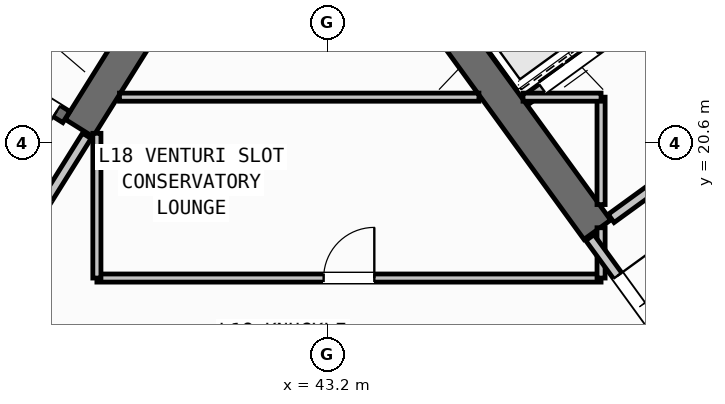
"""IFC4 building model, lengths in metres.
Left out: names, types, materials, properties, quantities, classifications, styles, units other than length and angle.
Written with IfcOpenShell. Run it as: python <this file> out.ifc"""

import sys

from ifc_helpers import new_model, si_unit, direction, frame, frame_2d, origin, place, context, subcontext, project, spatial, rectangle, extrude, source, transform, mapped, element, fill, save


model = new_model("IFC4")
c1 = context("Model", 3, precision=1e-05, world=origin(), true_north=direction((0.0, 1.0)))
c2 = subcontext(c1, "Body", "Model", "MODEL_VIEW")
j1 = project(units=[si_unit("LENGTHUNIT", "METRE"), si_unit("PLANEANGLEUNIT", "RADIAN")], contexts=[c1])
p1 = place(None, origin())
s1 = spatial("IfcSite", under=j1, at=p1, CompositionType="ELEMENT")
p2 = place(p1, origin())
s2 = spatial("IfcBuilding", under=s1, at=p2, CompositionType="ELEMENT")
p3 = place(p2, frame((0.0, 0.0, 71.7)))
s3 = spatial("IfcBuildingStorey", under=s2, at=p3, CompositionType="ELEMENT", Elevation=71.7)
p4 = place(p3, frame((40.168, 23.88, 0.0), z_axis=(0.0, 0.0, 1.0), x_axis=(-0.529893103397, -0.8480644427, 0.0)))
e1 = element("IfcWall", 1, at=p4, inside=s3, PredefinedType="SHEAR", context=c2, shape_type="SweptSolid", body=[
    extrude(rectangle(XDim=3.525, YDim=0.65, at=frame_2d((1.763, 0.0))), origin(), (0.0, 0.0, 1.0), 4.52),
])
p5 = place(p3, frame((48.526, 18.884, 0.0), z_axis=(0.0, 0.0, 1.0), x_axis=(-0.58777996584, 0.809020835181, 0.0)))
e2 = element("IfcWall", 2, at=p5, inside=s3, PredefinedType="SHEAR", context=c2, shape_type="SweptSolid", body=[
    extrude(rectangle(XDim=6.375, YDim=0.65, at=frame_2d((3.188, 0.0))), origin(), (0.0, 0.0, 1.0), 4.52),
])
p6 = place(p3, frame((38.046, 21.108, 0.0), z_axis=(0.0, 0.0, 1.0), x_axis=(-0.848054434086, 0.529909121291, 0.0)))
e3 = element("IfcWall", 3, at=p6, inside=s3, PredefinedType="SHEAR", context=c2, shape_type="SweptSolid", body=[
    extrude(rectangle(XDim=7.33, YDim=0.26, at=frame_2d((3.665, 0.0))), origin(), (0.0, 0.0, 1.0), 4.52),
])
p7 = place(p6, frame((0.22, 0.0, 0.0)))
e4 = element("IfcOpeningElement", 4, at=p7, cuts=e3, PredefinedType="OPENING", context=c2, shape_type="SweptSolid", body=[
    extrude(rectangle(XDim=1.1, YDim=2.1, at=frame_2d((0.55, 1.05))), frame((0.0, 0.14, 0.0), z_axis=(0.0, -1.0, 0.0), x_axis=(1.0, 0.0, 0.0)), (0.0, 0.0, 1.0), 0.28),
])
p8 = place(p3, frame((47.106, 21.437, 0.0), z_axis=(0.0, 0.0, 1.0), x_axis=(0.809012514015, 0.58779141893, 0.0)))
e5 = element("IfcWall", 5, at=p8, inside=s3, PredefinedType="STANDARD", context=c2, shape_type="SweptSolid", body=[
    extrude(rectangle(XDim=3.398, YDim=0.2, at=frame_2d((1.699, 0.0))), origin(), (0.0, 0.0, 1.0), 4.51),
])
p9 = place(p8, frame((0.408, 0.0, 0.0)))
e6 = element("IfcOpeningElement", 6, at=p9, cuts=e5, PredefinedType="OPENING", context=c2, shape_type="SweptSolid", body=[
    extrude(rectangle(XDim=1.3, YDim=2.2, at=frame_2d((0.65, 1.1))), frame((0.0, 0.11, 0.0), z_axis=(0.0, -1.0, 0.0), x_axis=(1.0, 0.0, 0.0)), (0.0, 0.0, 1.0), 0.22),
])
p10 = place(p3, frame((48.799, 19.107, 0.0), z_axis=(0.0, 0.0, 1.0), x_axis=(0.809012959416, 0.587790805897, 0.0)))
e7 = element("IfcWall", 7, at=p10, inside=s3, PredefinedType="STANDARD", context=c2, shape_type="SweptSolid", body=[
    extrude(rectangle(XDim=5.718, YDim=0.2, at=frame_2d((2.859, 0.0))), origin(), (0.0, 0.0, 1.0), 4.51),
])
p11 = place(p10, frame((2.498, 0.0, 0.0)))
e8 = element("IfcOpeningElement", 8, at=p11, cuts=e7, PredefinedType="OPENING", context=c2, shape_type="SweptSolid", body=[
    extrude(rectangle(XDim=1.15, YDim=2.1, at=frame_2d((0.575, 1.05))), frame((0.0, 0.11, 0.0), z_axis=(0.0, -1.0, 0.0), x_axis=(1.0, 0.0, 0.0)), (0.0, 0.0, 1.0), 0.22),
])
p12 = place(p3, frame((38.451, 20.737, 0.0), z_axis=(0.0, 0.0, 1.0), x_axis=(-0.529924799939, -0.848044637038, 0.0)))
e9 = element("IfcWall", 9, at=p12, inside=s3, PredefinedType="STANDARD", context=c2, shape_type="SweptSolid", body=[
    extrude(rectangle(XDim=2.96, YDim=0.2, at=frame_2d((1.48, 0.0))), origin(), (0.0, 0.0, 1.0), 4.51),
])
p13 = place(p12, frame((1.46, 0.0, 0.0)))
e10 = element("IfcOpeningElement", 10, at=p13, cuts=e9, PredefinedType="OPENING", context=c2, shape_type="SweptSolid", body=[
    extrude(rectangle(XDim=0.86, YDim=2.05, at=frame_2d((0.43, 1.025))), frame((0.0, 0.11, 0.0), z_axis=(0.0, -1.0, 0.0), x_axis=(1.0, 0.0, 0.0)), (0.0, 0.0, 1.0), 0.22),
])
p14 = place(p3, frame((38.65, 17.93, 0.0), z_axis=(0.0, 0.0, 1.0), x_axis=(1.0, 0.0, 0.0)))
e11 = element("IfcWall", 11, at=p14, inside=s3, PredefinedType="PARTITIONING", context=c2, shape_type="SweptSolid", body=[
    extrude(rectangle(XDim=9.95, YDim=0.16, at=frame_2d((4.975, 0.0))), origin(), (0.0, 0.0, 1.0), 4.51),
])
p15 = place(p14, frame((4.475, 0.0, 0.0)))
e12 = element("IfcOpeningElement", 12, at=p15, cuts=e11, PredefinedType="OPENING", context=c2, shape_type="SweptSolid", body=[
    extrude(rectangle(XDim=1.0, YDim=2.1, at=frame_2d((0.5, 1.05))), frame((0.0, 0.09, 0.0), z_axis=(0.0, -1.0, 0.0), x_axis=(1.0, 0.0, 0.0)), (0.0, 0.0, 1.0), 0.18),
])
p16 = place(p3, frame((38.65, 17.93, 0.0), z_axis=(0.0, 0.0, 1.0), x_axis=(0.0, 1.0, 0.0)))
e13 = element("IfcWall", 13, at=p16, inside=s3, PredefinedType="PARTITIONING", context=c2, shape_type="SweptSolid", body=[
    extrude(rectangle(XDim=2.857, YDim=0.16, at=frame_2d((1.428, 0.0))), origin(), (0.0, 0.0, 1.0), 4.51),
])
p17 = place(p3, frame((48.6, 17.93, 0.0), z_axis=(0.0, 0.0, 1.0), x_axis=(0.0, 1.0, 0.0)))
e14 = element("IfcWall", 14, at=p17, inside=s3, PredefinedType="PARTITIONING", context=c2, shape_type="SweptSolid", body=[
    extrude(rectangle(XDim=0.993, YDim=0.16, at=frame_2d((0.496, 0.0))), origin(), (0.0, 0.0, 1.0), 4.51),
])
p18 = place(p3, frame((48.6, 19.38, 0.0), z_axis=(0.0, 0.0, 1.0), x_axis=(0.0, 1.0, 0.0)))
e15 = element("IfcWall", 15, at=p18, inside=s3, PredefinedType="PARTITIONING", context=c2, shape_type="SweptSolid", body=[
    extrude(rectangle(XDim=2.12, YDim=0.16, at=frame_2d((1.06, 0.0))), origin(), (0.0, 0.0, 1.0), 4.51),
])
p19 = place(p3, frame((39.095, 21.5, 0.0), z_axis=(0.0, 0.0, 1.0), x_axis=(1.0, 0.0, 0.0)))
e16 = element("IfcWall", 16, at=p19, inside=s3, PredefinedType="PARTITIONING", context=c2, shape_type="SweptSolid", body=[
    extrude(rectangle(XDim=7.094, YDim=0.16, at=frame_2d((3.547, 0.0))), origin(), (0.0, 0.0, 1.0), 4.51),
])
p20 = place(p3, frame((47.06, 21.5, 0.0), z_axis=(0.0, 0.0, 1.0), x_axis=(1.0, 0.0, 0.0)))
e17 = element("IfcWall", 17, at=p20, inside=s3, PredefinedType="PARTITIONING", context=c2, shape_type="SweptSolid", body=[
    extrude(rectangle(XDim=1.54, YDim=0.16, at=frame_2d((0.77, 0.0))), origin(), (0.0, 0.0, 1.0), 4.51),
])
p21 = place(p3, frame((50.119, 16.333, 0.0), z_axis=(0.0, 0.0, 1.0), x_axis=(-0.587749856981, 0.809042709391, 0.0)))
e18 = element("IfcWall", 18, at=p21, inside=s3, PredefinedType="STANDARD", context=c2, shape_type="SweptSolid", body=[
    extrude(rectangle(XDim=2.96, YDim=0.2, at=frame_2d((1.48, 0.0))), origin(), (0.0, 0.0, 1.0), 4.51),
])
p22 = place(p21, frame((0.53, 0.0, 0.0)))
e19 = element("IfcOpeningElement", 19, at=p22, cuts=e18, PredefinedType="OPENING", context=c2, shape_type="SweptSolid", body=[
    extrude(rectangle(XDim=1.5, YDim=2.15, at=frame_2d((0.75, 1.075))), frame((0.0, 0.11, 0.0), z_axis=(0.0, -1.0, 0.0), x_axis=(1.0, 0.0, 0.0)), (0.0, 0.0, 1.0), 0.22),
])
m1 = source(origin(), c2, "Body", "SweptSolid", [
    extrude(rectangle(XDim=1.1, YDim=2.1, at=frame_2d((0.55, 1.05))), frame((0.0, 0.025, 0.0), z_axis=(0.0, -1.0, 0.0), x_axis=(1.0, 0.0, 0.0)), (0.0, 0.0, 1.0), 0.05),
])
p23 = place(p7, origin())
e20 = element("IfcDoor", 20, at=p23, inside=s3, OperationType="SINGLE_SWING_LEFT", PredefinedType="DOOR", context=c2, shape_type="MappedRepresentation", body=[
    mapped(m1, transform((0.0, 0.0, 0.0), scale=1.0)),
])
fill(e4, e20)
m2 = source(origin(), c2, "Body", "SweptSolid", [
    extrude(rectangle(XDim=1.3, YDim=2.2, at=frame_2d((0.65, 1.1))), frame((0.0, 0.025, 0.0), z_axis=(0.0, -1.0, 0.0), x_axis=(1.0, 0.0, 0.0)), (0.0, 0.0, 1.0), 0.05),
])
p24 = place(p9, origin())
e21 = element("IfcDoor", 21, at=p24, inside=s3, OperationType="DOUBLE_DOOR_SLIDING", PredefinedType="DOOR", context=c2, shape_type="MappedRepresentation", body=[
    mapped(m2, transform((0.0, 0.0, 0.0), scale=1.0)),
])
fill(e6, e21)
m3 = source(origin(), c2, "Body", "SweptSolid", [
    extrude(rectangle(XDim=1.0, YDim=2.1, at=frame_2d((0.5, 1.05))), frame((0.0, 0.025, 0.0), z_axis=(0.0, -1.0, 0.0), x_axis=(1.0, 0.0, 0.0)), (0.0, 0.0, 1.0), 0.05),
])
p25 = place(p15, origin())
e22 = element("IfcDoor", 22, at=p25, inside=s3, OperationType="SINGLE_SWING_RIGHT", PredefinedType="DOOR", context=c2, shape_type="MappedRepresentation", body=[
    mapped(m3, transform((0.0, 0.0, 0.0), scale=1.0)),
])
fill(e12, e22)
m4 = source(origin(), c2, "Body", "SweptSolid", [
    extrude(rectangle(XDim=1.5, YDim=2.15, at=frame_2d((0.75, 1.075))), frame((0.0, 0.025, 0.0), z_axis=(0.0, -1.0, 0.0), x_axis=(1.0, 0.0, 0.0)), (0.0, 0.0, 1.0), 0.05),
])
p26 = place(p22, frame((1.5, 0.0, 0.0), z_axis=(0.0, 0.0, 1.0), x_axis=(-1.0, 0.0, 0.0)))
e23 = element("IfcDoor", 23, at=p26, inside=s3, OperationType="DOUBLE_DOOR_SINGLE_SWING", PredefinedType="DOOR", context=c2, shape_type="MappedRepresentation", body=[
    mapped(m4, transform((0.0, 0.0, 0.0), scale=1.0)),
])
fill(e19, e23)
save(model, sys.argv[1])
